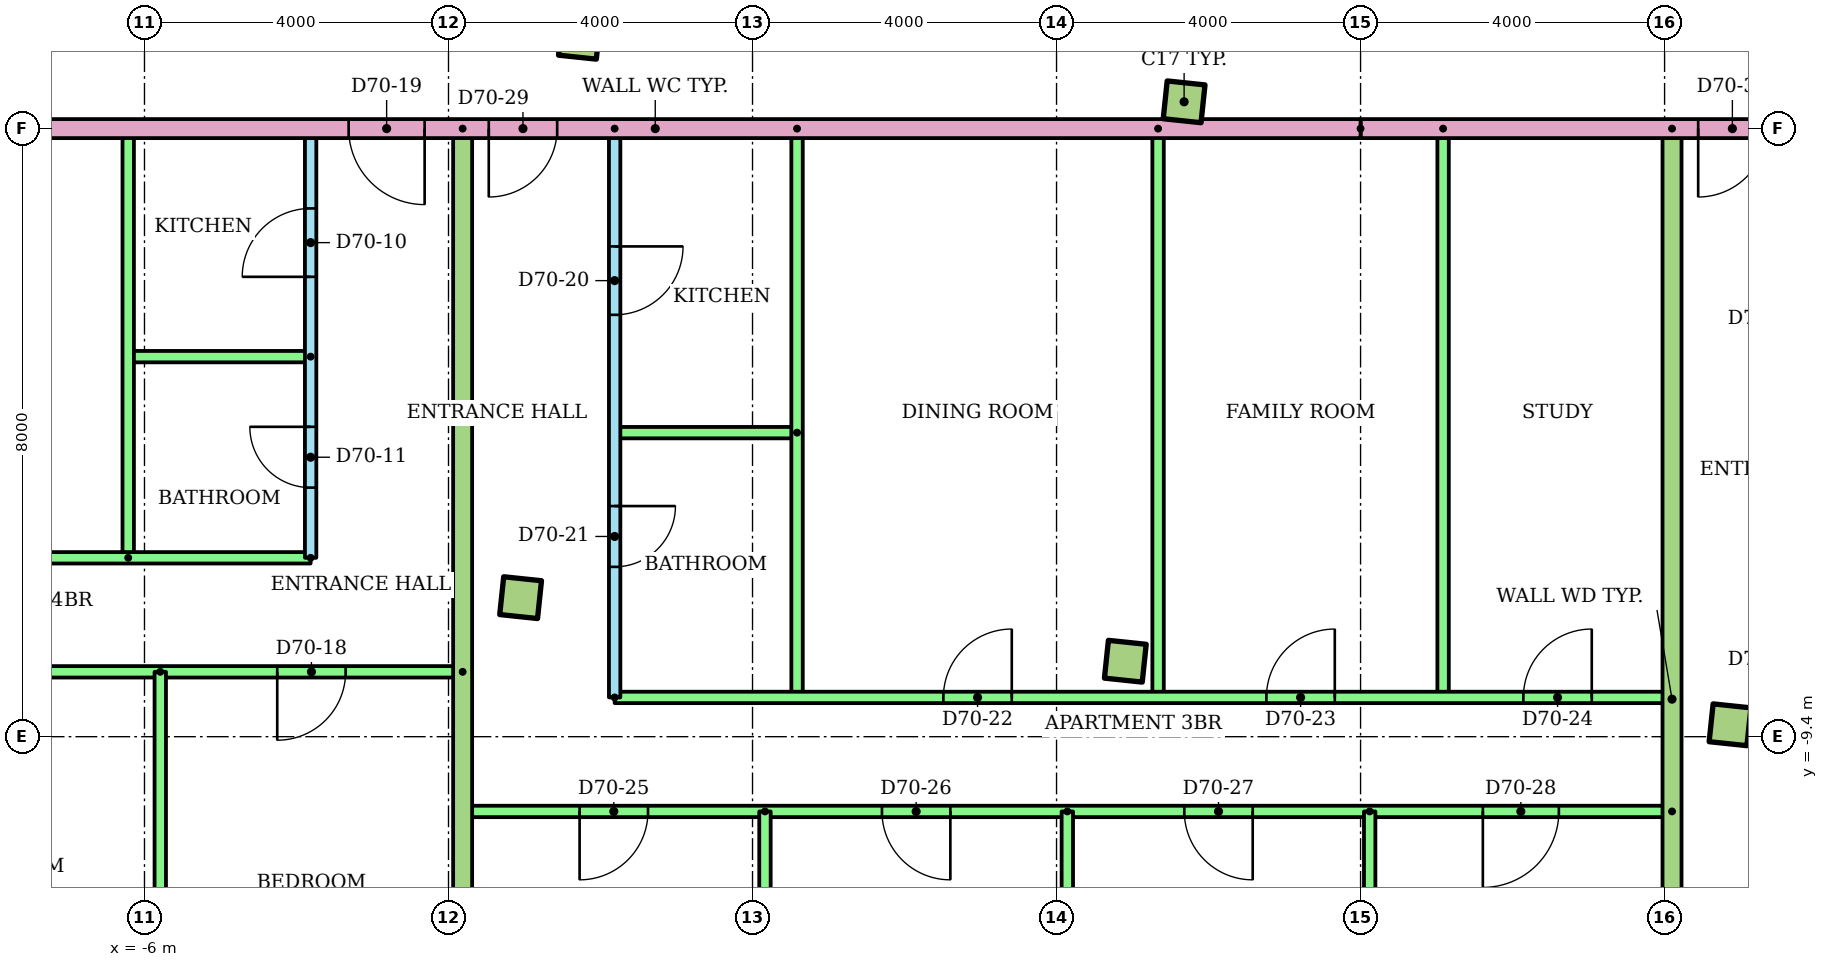
"""IFC4 building model, lengths in metres.
Left out: names, types, materials, properties, quantities, classifications, styles, units other than length and angle.
Written with IfcOpenShell. Run it as: python <this file> out.ifc"""

import sys

from ifc_helpers import new_model, si_unit, direction, frame, frame_2d, origin, origin_2d, place, context, subcontext, project, spatial, rectangle, extrude, element, fill, save


model = new_model("IFC4")
c1 = context("Model", 3, precision=1e-05, world=origin(), true_north=direction((0.0, 1.0)))
c2 = subcontext(c1, "Body", "Model", "MODEL_VIEW")
j1 = project(units=[si_unit("LENGTHUNIT", "METRE"), si_unit("PLANEANGLEUNIT", "RADIAN")], contexts=[c1])
p1 = place(None, origin())
s1 = spatial("IfcSite", under=j1, at=p1, CompositionType="ELEMENT")
p2 = place(p1, origin())
s2 = spatial("IfcBuilding", under=s1, at=p2, CompositionType="ELEMENT")
p3 = place(p2, frame((0.0, 0.0, 269.1)))
s3 = spatial("IfcBuildingStorey", under=s2, at=p3, CompositionType="ELEMENT", Elevation=269.1)
for number, where, z_axis, x_axis in (
    (1, (-1.051, -7.571, 0.0), (0.0, 0.0, 1.0), (0.995, -0.105, 0.0)),
    (2, (6.905, -8.407, 0.0), (0.0, 0.0, 1.0), (0.995, -0.105, 0.0)),
    (3, (14.861, -9.243, 0.0), (0.0, 0.0, 1.0), (0.995, -0.105, 0.0)),
    (4, (-0.278, -0.211, 0.0), (0.0, 0.0, 1.0), (0.995, -0.105, 0.0)),
    (5, (7.678, -1.048, 0.0), (0.0, 0.0, 1.0), (0.995, -0.105, 0.0)),
):
    element("IfcColumn", number, at=place(p3, frame(where, z_axis=z_axis, x_axis=x_axis)), inside=s3, PredefinedType="COLUMN", context=c2, shape_type="SweptSolid", body=[
        extrude(rectangle(XDim=0.5, YDim=0.5, at=origin_2d()), origin(), (0.0, 0.0, 1.0), 3.2),
    ])
p4 = place(p3, frame((-3.814, -7.047, 0.0), z_axis=(0.0, 0.0, 1.0), x_axis=(0.0, 1.0, 0.0)))
e6 = element("IfcWall", 6, at=p4, inside=s3, PredefinedType="PARTITIONING", context=c2, shape_type="SweptSolid", body=[
    extrude(rectangle(XDim=5.647, YDim=0.15, at=frame_2d((2.823, 0.0))), origin(), (0.0, 0.0, 1.0), 2.4),
])
p5 = place(p4, frame((3.697, 0.0, 0.0)))
e7 = element("IfcOpeningElement", 7, at=p5, cuts=e6, PredefinedType="OPENING", context=c2, shape_type="SweptSolid", body=[
    extrude(rectangle(XDim=0.9, YDim=2.1, at=frame_2d((0.45, 1.05))), frame((0.0, 0.085, 0.0), z_axis=(0.0, -1.0, 0.0), x_axis=(1.0, 0.0, 0.0)), (0.0, 0.0, 1.0), 0.17),
])
p6 = place(p4, frame((0.923, 0.0, 0.0)))
e8 = element("IfcOpeningElement", 8, at=p6, cuts=e6, PredefinedType="OPENING", context=c2, shape_type="SweptSolid", body=[
    extrude(rectangle(XDim=0.8, YDim=2.1, at=frame_2d((0.4, 1.05))), frame((0.0, 0.085, 0.0), z_axis=(0.0, -1.0, 0.0), x_axis=(1.0, 0.0, 0.0)), (0.0, 0.0, 1.0), 0.17),
])
p7 = place(p3, frame((-3.814, -4.4, 0.0), z_axis=(0.0, 0.0, 1.0), x_axis=(-1.0, 0.0, 0.0)))
e9 = element("IfcWall", 9, at=p7, inside=s3, PredefinedType="PARTITIONING", context=c2, shape_type="SweptSolid", body=[
    extrude(rectangle(XDim=2.4, YDim=0.15, at=frame_2d((1.2, 0.0))), origin(), (0.0, 0.0, 1.0), 2.4),
])
p8 = place(p3, frame((-6.214, -7.047, 0.0), z_axis=(0.0, 0.0, 1.0), x_axis=(0.0, 1.0, 0.0)))
e10 = element("IfcWall", 10, at=p8, inside=s3, PredefinedType="PARTITIONING", context=c2, shape_type="SweptSolid", body=[
    extrude(rectangle(XDim=5.647, YDim=0.15, at=frame_2d((2.823, 0.0))), origin(), (0.0, 0.0, 1.0), 2.4),
])
p9 = place(p3, frame((-24.144, -7.047, 0.0)))
e11 = element("IfcWall", 11, at=p9, inside=s3, PredefinedType="PARTITIONING", context=c2, shape_type="SweptSolid", body=[
    extrude(rectangle(XDim=20.33, YDim=0.15, at=frame_2d((10.165, 0.0))), origin(), (0.0, 0.0, 1.0), 2.4),
])
p10 = place(p9, frame((13.73, 0.0, 0.0)))
e12 = element("IfcOpeningElement", 12, at=p10, cuts=e11, PredefinedType="OPENING", context=c2, shape_type="SweptSolid", body=[
    extrude(rectangle(XDim=0.9, YDim=2.1, at=frame_2d((0.45, 1.05))), frame((0.0, 0.085, 0.0), z_axis=(0.0, -1.0, 0.0), x_axis=(1.0, 0.0, 0.0)), (0.0, 0.0, 1.0), 0.17),
])
p11 = place(p9, frame((7.585, 0.0, 0.0)))
e13 = element("IfcOpeningElement", 13, at=p11, cuts=e11, PredefinedType="OPENING", context=c2, shape_type="SweptSolid", body=[
    extrude(rectangle(XDim=0.9, YDim=2.1, at=frame_2d((0.45, 1.05))), frame((0.0, 0.085, 0.0), z_axis=(0.0, -1.0, 0.0), x_axis=(1.0, 0.0, 0.0)), (0.0, 0.0, 1.0), 0.17),
])
p12 = place(p9, frame((1.968, 0.0, 0.0)))
e14 = element("IfcOpeningElement", 14, at=p12, cuts=e11, PredefinedType="OPENING", context=c2, shape_type="SweptSolid", body=[
    extrude(rectangle(XDim=0.9, YDim=2.1, at=frame_2d((0.45, 1.05))), frame((0.0, 0.085, 0.0), z_axis=(0.0, -1.0, 0.0), x_axis=(1.0, 0.0, 0.0)), (0.0, 0.0, 1.0), 0.17),
])
p13 = place(p3, frame((-1.814, -8.547, 0.0), z_axis=(0.0, 0.0, 1.0), x_axis=(-1.0, 0.0, 0.0)))
e15 = element("IfcWall", 15, at=p13, inside=s3, PredefinedType="PARTITIONING", context=c2, shape_type="SweptSolid", body=[
    extrude(rectangle(XDim=20.767, YDim=0.15, at=frame_2d((10.384, 0.0))), origin(), (0.0, 0.0, 1.0), 2.4),
])
p14 = place(p13, frame((16.604, 0.0, 0.0)))
e16 = element("IfcOpeningElement", 16, at=p14, cuts=e15, PredefinedType="OPENING", context=c2, shape_type="SweptSolid", body=[
    extrude(rectangle(XDim=0.9, YDim=2.1, at=frame_2d((0.45, 1.05))), frame((0.0, 0.085, 0.0), z_axis=(0.0, -1.0, 0.0), x_axis=(1.0, 0.0, 0.0)), (0.0, 0.0, 1.0), 0.17),
])
p15 = place(p13, frame((9.446, 0.0, 0.0)))
e17 = element("IfcOpeningElement", 17, at=p15, cuts=e15, PredefinedType="OPENING", context=c2, shape_type="SweptSolid", body=[
    extrude(rectangle(XDim=1.0, YDim=2.1, at=frame_2d((0.5, 1.05))), frame((0.0, 0.085, 0.0), z_axis=(0.0, -1.0, 0.0), x_axis=(1.0, 0.0, 0.0)), (0.0, 0.0, 1.0), 0.17),
])
p16 = place(p13, frame((5.517, 0.0, 0.0)))
e18 = element("IfcOpeningElement", 18, at=p16, cuts=e15, PredefinedType="OPENING", context=c2, shape_type="SweptSolid", body=[
    extrude(rectangle(XDim=0.9, YDim=2.1, at=frame_2d((0.45, 1.05))), frame((0.0, 0.085, 0.0), z_axis=(0.0, -1.0, 0.0), x_axis=(1.0, 0.0, 0.0)), (0.0, 0.0, 1.0), 0.17),
])
p17 = place(p13, frame((1.539, 0.0, 0.0)))
e19 = element("IfcOpeningElement", 19, at=p17, cuts=e15, PredefinedType="OPENING", context=c2, shape_type="SweptSolid", body=[
    extrude(rectangle(XDim=0.9, YDim=2.1, at=frame_2d((0.45, 1.05))), frame((0.0, 0.085, 0.0), z_axis=(0.0, -1.0, 0.0), x_axis=(1.0, 0.0, 0.0)), (0.0, 0.0, 1.0), 0.17),
])
p18 = place(p3, frame((-5.792, -8.547, 0.0), z_axis=(0.0, 0.0, 1.0), x_axis=(0.0, -1.0, 0.0)))
e20 = element("IfcWall", 20, at=p18, inside=s3, PredefinedType="PARTITIONING", context=c2, shape_type="SweptSolid", body=[
    extrude(rectangle(XDim=5.787, YDim=0.15, at=frame_2d((2.893, 0.0))), origin(), (0.0, 0.0, 1.0), 2.4),
])
p19 = place(p3, frame((0.186, -1.4, 0.0), z_axis=(0.0, 0.0, 1.0), x_axis=(0.0, -1.0, 0.0)))
e21 = element("IfcWall", 21, at=p19, inside=s3, PredefinedType="PARTITIONING", context=c2, shape_type="SweptSolid", body=[
    extrude(rectangle(XDim=7.484, YDim=0.15, at=frame_2d((3.742, 0.0))), origin(), (0.0, 0.0, 1.0), 2.4),
])
p20 = place(p19, frame((1.55, 0.0, 0.0)))
e22 = element("IfcOpeningElement", 22, at=p20, cuts=e21, PredefinedType="OPENING", context=c2, shape_type="SweptSolid", body=[
    extrude(rectangle(XDim=0.9, YDim=2.1, at=frame_2d((0.45, 1.05))), frame((0.0, 0.085, 0.0), z_axis=(0.0, -1.0, 0.0), x_axis=(1.0, 0.0, 0.0)), (0.0, 0.0, 1.0), 0.17),
])
p21 = place(p19, frame((4.966, 0.0, 0.0)))
e23 = element("IfcOpeningElement", 23, at=p21, cuts=e21, PredefinedType="OPENING", context=c2, shape_type="SweptSolid", body=[
    extrude(rectangle(XDim=0.8, YDim=2.1, at=frame_2d((0.4, 1.05))), frame((0.0, 0.085, 0.0), z_axis=(0.0, -1.0, 0.0), x_axis=(1.0, 0.0, 0.0)), (0.0, 0.0, 1.0), 0.17),
])
p22 = place(p3, frame((2.586, -5.4, 0.0), z_axis=(0.0, 0.0, 1.0), x_axis=(-1.0, 0.0, 0.0)))
e24 = element("IfcWall", 24, at=p22, inside=s3, PredefinedType="PARTITIONING", context=c2, shape_type="SweptSolid", body=[
    extrude(rectangle(XDim=2.4, YDim=0.15, at=frame_2d((1.2, 0.0))), origin(), (0.0, 0.0, 1.0), 2.4),
])
for number, where, z_axis, x_axis in (
    (25, (2.586, -1.4, 0.0), (0.0, 0.0, 1.0), (0.0, -1.0, 0.0)),
    (26, (7.336, -1.4, 0.0), (0.0, 0.0, 1.0), (0.0, -1.0, 0.0)),
    (27, (11.086, -1.4, 0.0), (0.0, 0.0, 1.0), (0.0, -1.0, 0.0)),
):
    element("IfcWall", number, at=place(p3, frame(where, z_axis=z_axis, x_axis=x_axis)), inside=s3, PredefinedType="PARTITIONING", context=c2, shape_type="SweptSolid", body=[
        extrude(rectangle(XDim=7.484, YDim=0.15, at=frame_2d((3.742, 0.0))), origin(), (0.0, 0.0, 1.0), 2.4),
    ])
p23 = place(p3, frame((0.186, -8.884, 0.0)))
e28 = element("IfcWall", 28, at=p23, inside=s3, PredefinedType="PARTITIONING", context=c2, shape_type="SweptSolid", body=[
    extrude(rectangle(XDim=13.912, YDim=0.15, at=frame_2d((6.956, 0.0))), origin(), (0.0, 0.0, 1.0), 2.4),
])
p24 = place(p23, frame((4.325, 0.0, 0.0)))
e29 = element("IfcOpeningElement", 29, at=p24, cuts=e28, PredefinedType="OPENING", context=c2, shape_type="SweptSolid", body=[
    extrude(rectangle(XDim=0.9, YDim=2.1, at=frame_2d((0.45, 1.05))), frame((0.0, 0.085, 0.0), z_axis=(0.0, -1.0, 0.0), x_axis=(1.0, 0.0, 0.0)), (0.0, 0.0, 1.0), 0.17),
])
p25 = place(p23, frame((8.575, 0.0, 0.0)))
e30 = element("IfcOpeningElement", 30, at=p25, cuts=e28, PredefinedType="OPENING", context=c2, shape_type="SweptSolid", body=[
    extrude(rectangle(XDim=0.9, YDim=2.1, at=frame_2d((0.45, 1.05))), frame((0.0, 0.085, 0.0), z_axis=(0.0, -1.0, 0.0), x_axis=(1.0, 0.0, 0.0)), (0.0, 0.0, 1.0), 0.17),
])
p26 = place(p23, frame((11.956, 0.0, 0.0)))
e31 = element("IfcOpeningElement", 31, at=p26, cuts=e28, PredefinedType="OPENING", context=c2, shape_type="SweptSolid", body=[
    extrude(rectangle(XDim=0.9, YDim=2.1, at=frame_2d((0.45, 1.05))), frame((0.0, 0.085, 0.0), z_axis=(0.0, -1.0, 0.0), x_axis=(1.0, 0.0, 0.0)), (0.0, 0.0, 1.0), 0.17),
])
p27 = place(p3, frame((14.098, -10.384, 0.0), z_axis=(0.0, 0.0, 1.0), x_axis=(-1.0, 0.0, 0.0)))
e32 = element("IfcWall", 32, at=p27, inside=s3, PredefinedType="PARTITIONING", context=c2, shape_type="SweptSolid", body=[
    extrude(rectangle(XDim=15.912, YDim=0.15, at=frame_2d((7.956, 0.0))), origin(), (0.0, 0.0, 1.0), 2.4),
])
p28 = place(p27, frame((13.473, 0.0, 0.0)))
e33 = element("IfcOpeningElement", 33, at=p28, cuts=e32, PredefinedType="OPENING", context=c2, shape_type="SweptSolid", body=[
    extrude(rectangle(XDim=0.9, YDim=2.1, at=frame_2d((0.45, 1.05))), frame((0.0, 0.085, 0.0), z_axis=(0.0, -1.0, 0.0), x_axis=(1.0, 0.0, 0.0)), (0.0, 0.0, 1.0), 0.17),
])
p29 = place(p27, frame((9.495, 0.0, 0.0)))
e34 = element("IfcOpeningElement", 34, at=p29, cuts=e32, PredefinedType="OPENING", context=c2, shape_type="SweptSolid", body=[
    extrude(rectangle(XDim=0.9, YDim=2.1, at=frame_2d((0.45, 1.05))), frame((0.0, 0.085, 0.0), z_axis=(0.0, -1.0, 0.0), x_axis=(1.0, 0.0, 0.0)), (0.0, 0.0, 1.0), 0.17),
])
p30 = place(p27, frame((5.517, 0.0, 0.0)))
e35 = element("IfcOpeningElement", 35, at=p30, cuts=e32, PredefinedType="OPENING", context=c2, shape_type="SweptSolid", body=[
    extrude(rectangle(XDim=0.9, YDim=2.1, at=frame_2d((0.45, 1.05))), frame((0.0, 0.085, 0.0), z_axis=(0.0, -1.0, 0.0), x_axis=(1.0, 0.0, 0.0)), (0.0, 0.0, 1.0), 0.17),
])
p31 = place(p27, frame((1.489, 0.0, 0.0)))
e36 = element("IfcOpeningElement", 36, at=p31, cuts=e32, PredefinedType="OPENING", context=c2, shape_type="SweptSolid", body=[
    extrude(rectangle(XDim=1.0, YDim=2.1, at=frame_2d((0.5, 1.05))), frame((0.0, 0.085, 0.0), z_axis=(0.0, -1.0, 0.0), x_axis=(1.0, 0.0, 0.0)), (0.0, 0.0, 1.0), 0.17),
])
p32 = place(p3, frame((2.164, -10.384, 0.0), z_axis=(0.0, 0.0, 1.0), x_axis=(0.0, -1.0, 0.0)))
e37 = element("IfcWall", 37, at=p32, inside=s3, PredefinedType="PARTITIONING", context=c2, shape_type="SweptSolid", body=[
    extrude(rectangle(XDim=4.786, YDim=0.15, at=frame_2d((2.393, 0.0))), origin(), (0.0, 0.0, 1.0), 2.4),
])
p33 = place(p3, frame((6.142, -10.384, 0.0), z_axis=(0.0, 0.0, 1.0), x_axis=(0.0, -1.0, 0.0)))
e38 = element("IfcWall", 38, at=p33, inside=s3, PredefinedType="PARTITIONING", context=c2, shape_type="SweptSolid", body=[
    extrude(rectangle(XDim=5.193, YDim=0.15, at=frame_2d((2.597, 0.0))), origin(), (0.0, 0.0, 1.0), 2.4),
])
p34 = place(p3, frame((10.12, -10.384, 0.0), z_axis=(0.0, 0.0, 1.0), x_axis=(0.0, -1.0, 0.0)))
e39 = element("IfcWall", 39, at=p34, inside=s3, PredefinedType="PARTITIONING", context=c2, shape_type="SweptSolid", body=[
    extrude(rectangle(XDim=5.622, YDim=0.15, at=frame_2d((2.811, 0.0))), origin(), (0.0, 0.0, 1.0), 2.4),
])
p35 = place(p3, frame((-1.814, -1.4, 0.0), z_axis=(0.0, 0.0, 1.0), x_axis=(0.0, -1.0, 0.0)))
e40 = element("IfcWall", 40, at=p35, inside=s3, PredefinedType="PARTITIONING", context=c2, shape_type="SweptSolid", body=[
    extrude(rectangle(XDim=13.341, YDim=0.25, at=frame_2d((6.67, 0.0))), origin(), (0.0, 0.0, 1.0), 2.4),
])
p36 = place(p3, frame((14.098, -1.4, 0.0), z_axis=(0.0, 0.0, 1.0), x_axis=(0.0, -1.0, 0.0)))
e41 = element("IfcWall", 41, at=p36, inside=s3, PredefinedType="PARTITIONING", context=c2, shape_type="SweptSolid", body=[
    extrude(rectangle(XDim=15.013, YDim=0.25, at=frame_2d((7.506, 0.0))), origin(), (0.0, 0.0, 1.0), 2.4),
])
p37 = place(p3, frame((25.0, -1.4, 0.0), z_axis=(0.0, 0.0, 1.0), x_axis=(-1.0, 0.0, 0.0)))
e42 = element("IfcWall", 42, at=p37, inside=s3, PredefinedType="PARTITIONING", context=c2, shape_type="SweptSolid", body=[
    extrude(rectangle(XDim=15.0, YDim=0.25, at=frame_2d((7.5, 0.0))), origin(), (0.0, 0.0, 1.0), 2.4),
])
p38 = place(p37, frame((9.658, 0.0, 0.0)))
e43 = element("IfcOpeningElement", 43, at=p38, cuts=e42, PredefinedType="OPENING", context=c2, shape_type="SweptSolid", body=[
    extrude(rectangle(XDim=0.9, YDim=2.1, at=frame_2d((0.45, 1.05))), frame((0.0, 0.135, 0.0), z_axis=(0.0, -1.0, 0.0), x_axis=(1.0, 0.0, 0.0)), (0.0, 0.0, 1.0), 0.27),
])
p39 = place(p3, frame((10.0, -1.4, 0.0), z_axis=(0.0, 0.0, 1.0), x_axis=(-1.0, 0.0, 0.0)))
e44 = element("IfcWall", 44, at=p39, inside=s3, PredefinedType="PARTITIONING", context=c2, shape_type="SweptSolid", body=[
    extrude(rectangle(XDim=20.0, YDim=0.25, at=frame_2d((10.0, 0.0))), origin(), (0.0, 0.0, 1.0), 2.4),
])
p40 = place(p39, frame((12.314, 0.0, 0.0)))
e45 = element("IfcOpeningElement", 45, at=p40, cuts=e44, PredefinedType="OPENING", context=c2, shape_type="SweptSolid", body=[
    extrude(rectangle(XDim=1.0, YDim=2.1, at=frame_2d((0.5, 1.05))), frame((0.0, 0.135, 0.0), z_axis=(0.0, -1.0, 0.0), x_axis=(1.0, 0.0, 0.0)), (0.0, 0.0, 1.0), 0.27),
])
p41 = place(p39, frame((10.57, 0.0, 0.0)))
e46 = element("IfcOpeningElement", 46, at=p41, cuts=e44, PredefinedType="OPENING", context=c2, shape_type="SweptSolid", body=[
    extrude(rectangle(XDim=0.9, YDim=2.1, at=frame_2d((0.45, 1.05))), frame((0.0, 0.135, 0.0), z_axis=(0.0, -1.0, 0.0), x_axis=(1.0, 0.0, 0.0)), (0.0, 0.0, 1.0), 0.27),
])
p42 = place(p5, origin())
e47 = element("IfcDoor", 47, at=p42, inside=s3, OperationType="SINGLE_SWING_LEFT", PredefinedType="DOOR", context=c2, shape_type="SweptSolid", body=[
    extrude(rectangle(XDim=0.9, YDim=2.1, at=frame_2d((0.45, 1.05))), frame((0.0, 0.025, 0.0), z_axis=(0.0, -1.0, 0.0), x_axis=(1.0, 0.0, 0.0)), (0.0, 0.0, 1.0), 0.05),
])
fill(e7, e47)
p43 = place(p6, origin())
e48 = element("IfcDoor", 48, at=p43, inside=s3, OperationType="SINGLE_SWING_RIGHT", PredefinedType="DOOR", context=c2, shape_type="SweptSolid", body=[
    extrude(rectangle(XDim=0.8, YDim=2.1, at=frame_2d((0.4, 1.05))), frame((0.0, 0.025, 0.0), z_axis=(0.0, -1.0, 0.0), x_axis=(1.0, 0.0, 0.0)), (0.0, 0.0, 1.0), 0.05),
])
fill(e8, e48)
p44 = place(p17, origin())
e49 = element("IfcDoor", 49, at=p44, inside=s3, OperationType="SINGLE_SWING_RIGHT", PredefinedType="DOOR", context=c2, shape_type="SweptSolid", body=[
    extrude(rectangle(XDim=0.9, YDim=2.1, at=frame_2d((0.45, 1.05))), frame((0.0, 0.025, 0.0), z_axis=(0.0, -1.0, 0.0), x_axis=(1.0, 0.0, 0.0)), (0.0, 0.0, 1.0), 0.05),
])
fill(e19, e49)
p45 = place(p40, origin())
e50 = element("IfcDoor", 50, at=p45, inside=s3, OperationType="SINGLE_SWING_LEFT", PredefinedType="DOOR", context=c2, shape_type="SweptSolid", body=[
    extrude(rectangle(XDim=1.0, YDim=2.1, at=frame_2d((0.5, 1.05))), frame((0.0, 0.025, 0.0), z_axis=(0.0, -1.0, 0.0), x_axis=(1.0, 0.0, 0.0)), (0.0, 0.0, 1.0), 0.05),
])
fill(e45, e50)
p46 = place(p20, origin())
e51 = element("IfcDoor", 51, at=p46, inside=s3, OperationType="SINGLE_SWING_LEFT", PredefinedType="DOOR", context=c2, shape_type="SweptSolid", body=[
    extrude(rectangle(XDim=0.9, YDim=2.1, at=frame_2d((0.45, 1.05))), frame((0.0, 0.025, 0.0), z_axis=(0.0, -1.0, 0.0), x_axis=(1.0, 0.0, 0.0)), (0.0, 0.0, 1.0), 0.05),
])
fill(e22, e51)
p47 = place(p21, origin())
e52 = element("IfcDoor", 52, at=p47, inside=s3, OperationType="SINGLE_SWING_LEFT", PredefinedType="DOOR", context=c2, shape_type="SweptSolid", body=[
    extrude(rectangle(XDim=0.8, YDim=2.1, at=frame_2d((0.4, 1.05))), frame((0.0, 0.025, 0.0), z_axis=(0.0, -1.0, 0.0), x_axis=(1.0, 0.0, 0.0)), (0.0, 0.0, 1.0), 0.05),
])
fill(e23, e52)
p48 = place(p24, origin())
e53 = element("IfcDoor", 53, at=p48, inside=s3, OperationType="SINGLE_SWING_RIGHT", PredefinedType="DOOR", context=c2, shape_type="SweptSolid", body=[
    extrude(rectangle(XDim=0.9, YDim=2.1, at=frame_2d((0.45, 1.05))), frame((0.0, 0.025, 0.0), z_axis=(0.0, -1.0, 0.0), x_axis=(1.0, 0.0, 0.0)), (0.0, 0.0, 1.0), 0.05),
])
fill(e29, e53)
p49 = place(p25, origin())
e54 = element("IfcDoor", 54, at=p49, inside=s3, OperationType="SINGLE_SWING_RIGHT", PredefinedType="DOOR", context=c2, shape_type="SweptSolid", body=[
    extrude(rectangle(XDim=0.9, YDim=2.1, at=frame_2d((0.45, 1.05))), frame((0.0, 0.025, 0.0), z_axis=(0.0, -1.0, 0.0), x_axis=(1.0, 0.0, 0.0)), (0.0, 0.0, 1.0), 0.05),
])
fill(e30, e54)
p50 = place(p26, origin())
e55 = element("IfcDoor", 55, at=p50, inside=s3, OperationType="SINGLE_SWING_RIGHT", PredefinedType="DOOR", context=c2, shape_type="SweptSolid", body=[
    extrude(rectangle(XDim=0.9, YDim=2.1, at=frame_2d((0.45, 1.05))), frame((0.0, 0.025, 0.0), z_axis=(0.0, -1.0, 0.0), x_axis=(1.0, 0.0, 0.0)), (0.0, 0.0, 1.0), 0.05),
])
fill(e31, e55)
p51 = place(p28, origin())
e56 = element("IfcDoor", 56, at=p51, inside=s3, OperationType="SINGLE_SWING_RIGHT", PredefinedType="DOOR", context=c2, shape_type="SweptSolid", body=[
    extrude(rectangle(XDim=0.9, YDim=2.1, at=frame_2d((0.45, 1.05))), frame((0.0, 0.025, 0.0), z_axis=(0.0, -1.0, 0.0), x_axis=(1.0, 0.0, 0.0)), (0.0, 0.0, 1.0), 0.05),
])
fill(e33, e56)
p52 = place(p29, origin())
e57 = element("IfcDoor", 57, at=p52, inside=s3, OperationType="SINGLE_SWING_LEFT", PredefinedType="DOOR", context=c2, shape_type="SweptSolid", body=[
    extrude(rectangle(XDim=0.9, YDim=2.1, at=frame_2d((0.45, 1.05))), frame((0.0, 0.025, 0.0), z_axis=(0.0, -1.0, 0.0), x_axis=(1.0, 0.0, 0.0)), (0.0, 0.0, 1.0), 0.05),
])
fill(e34, e57)
p53 = place(p30, origin())
e58 = element("IfcDoor", 58, at=p53, inside=s3, OperationType="SINGLE_SWING_LEFT", PredefinedType="DOOR", context=c2, shape_type="SweptSolid", body=[
    extrude(rectangle(XDim=0.9, YDim=2.1, at=frame_2d((0.45, 1.05))), frame((0.0, 0.025, 0.0), z_axis=(0.0, -1.0, 0.0), x_axis=(1.0, 0.0, 0.0)), (0.0, 0.0, 1.0), 0.05),
])
fill(e35, e58)
p54 = place(p31, origin())
e59 = element("IfcDoor", 59, at=p54, inside=s3, OperationType="SINGLE_SWING_RIGHT", PredefinedType="DOOR", context=c2, shape_type="SweptSolid", body=[
    extrude(rectangle(XDim=1.0, YDim=2.1, at=frame_2d((0.5, 1.05))), frame((0.0, 0.025, 0.0), z_axis=(0.0, -1.0, 0.0), x_axis=(1.0, 0.0, 0.0)), (0.0, 0.0, 1.0), 0.05),
])
fill(e36, e59)
p55 = place(p41, origin())
e60 = element("IfcDoor", 60, at=p55, inside=s3, OperationType="SINGLE_SWING_RIGHT", PredefinedType="DOOR", context=c2, shape_type="SweptSolid", body=[
    extrude(rectangle(XDim=0.9, YDim=2.1, at=frame_2d((0.45, 1.05))), frame((0.0, 0.025, 0.0), z_axis=(0.0, -1.0, 0.0), x_axis=(1.0, 0.0, 0.0)), (0.0, 0.0, 1.0), 0.05),
])
fill(e46, e60)
p56 = place(p38, origin())
e61 = element("IfcDoor", 61, at=p56, inside=s3, OperationType="SINGLE_SWING_RIGHT", PredefinedType="DOOR", context=c2, shape_type="SweptSolid", body=[
    extrude(rectangle(XDim=0.9, YDim=2.1, at=frame_2d((0.45, 1.05))), frame((0.0, 0.025, 0.0), z_axis=(0.0, -1.0, 0.0), x_axis=(1.0, 0.0, 0.0)), (0.0, 0.0, 1.0), 0.05),
])
fill(e43, e61)
save(model, sys.argv[1])
